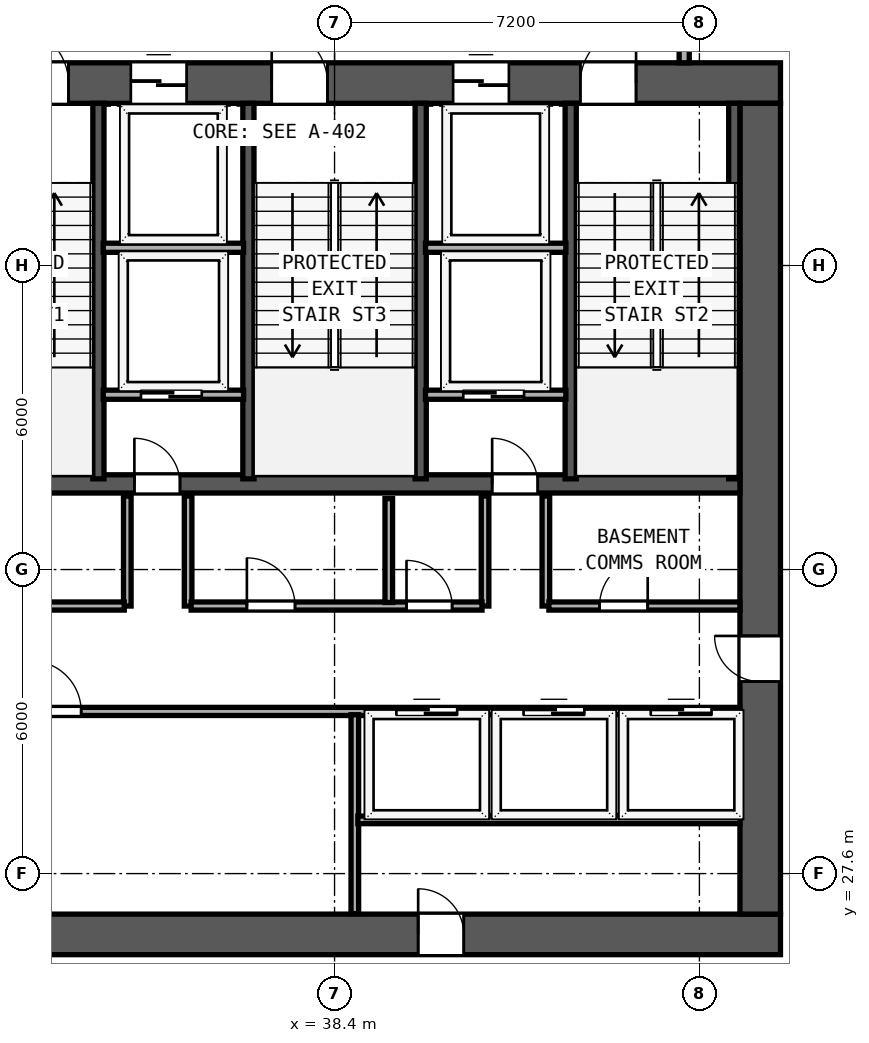
"""IFC4 building model, lengths in metres.
Left out: names, types, materials, properties, quantities, classifications, styles, units other than length and angle.
Written with IfcOpenShell. Run it as: python <this file> out.ifc"""

import sys

from ifc_helpers import new_model, si_unit, direction, frame, frame_2d, origin, place, context, subcontext, project, spatial, rectangle, extrude, element, fill, save


model = new_model("IFC4")
c1 = context("Model", 3, precision=1e-05, world=origin(), true_north=direction((0.0, 1.0)))
c2 = subcontext(c1, "Body", "Model", "MODEL_VIEW")
j1 = project(units=[si_unit("LENGTHUNIT", "METRE"), si_unit("PLANEANGLEUNIT", "RADIAN")], contexts=[c1])
p1 = place(None, origin())
s1 = spatial("IfcSite", under=j1, at=p1, CompositionType="ELEMENT")
p2 = place(p1, origin())
s2 = spatial("IfcBuilding", under=s1, at=p2, CompositionType="ELEMENT")
p3 = place(p2, frame((0.0, 0.0, -4.8)))
s3 = spatial("IfcBuildingStorey", under=s2, at=p3, CompositionType="ELEMENT", Elevation=-4.8)
p4 = place(p3, frame((29.6, 26.4, 0.0), z_axis=(0.0, 0.0, 1.0), x_axis=(1.0, 0.0, 0.0)))
e1 = element("IfcWall", 1, at=p4, inside=s3, PredefinedType="SHEAR", context=c2, shape_type="SweptSolid", body=[
    extrude(rectangle(XDim=17.6, YDim=0.8, at=frame_2d((8.8, 0.0))), origin(), (0.0, 0.0, 1.0), 4.5),
])
p5 = place(p4, frame((11.35, 0.0, 0.0), z_axis=(0.0, 0.0, 1.0), x_axis=(-1.0, 0.0, 0.0)))
e2 = element("IfcOpeningElement", 2, at=p5, cuts=e1, PredefinedType="OPENING", context=c2, shape_type="SweptSolid", body=[
    extrude(rectangle(XDim=0.9, YDim=2.1, at=frame_2d((0.45, 1.05))), frame((0.0, 0.41, 0.0), z_axis=(0.0, -1.0, 0.0), x_axis=(1.0, 0.0, 0.0)), (0.0, 0.0, 1.0), 0.82),
])
p6 = place(p3, frame((29.6, 43.2, 0.0), z_axis=(0.0, 0.0, 1.0), x_axis=(1.0, 0.0, 0.0)))
e3 = element("IfcWall", 3, at=p6, inside=s3, PredefinedType="SHEAR", context=c2, shape_type="SweptSolid", body=[
    extrude(rectangle(XDim=17.6, YDim=0.8, at=frame_2d((8.8, 0.0))), origin(), (0.0, 0.0, 1.0), 4.5),
])
p7 = place(p6, frame((2.45, 0.0, 0.0)))
e4 = element("IfcOpeningElement", 4, at=p7, cuts=e3, PredefinedType="OPENING", context=c2, shape_type="SweptSolid", body=[
    extrude(rectangle(XDim=1.1, YDim=2.15, at=frame_2d((0.55, 1.075))), frame((0.0, 0.41, 0.0), z_axis=(0.0, -1.0, 0.0), x_axis=(1.0, 0.0, 0.0)), (0.0, 0.0, 1.0), 0.82),
])
p8 = place(p6, frame((7.56, 0.0, 0.0)))
e5 = element("IfcOpeningElement", 5, at=p8, cuts=e3, PredefinedType="OPENING", context=c2, shape_type="SweptSolid", body=[
    extrude(rectangle(XDim=1.1, YDim=2.15, at=frame_2d((0.55, 1.075))), frame((0.0, 0.41, 0.0), z_axis=(0.0, -1.0, 0.0), x_axis=(1.0, 0.0, 0.0)), (0.0, 0.0, 1.0), 0.82),
])
p9 = place(p6, frame((13.65, 0.0, 0.0)))
e6 = element("IfcOpeningElement", 6, at=p9, cuts=e3, PredefinedType="OPENING", context=c2, shape_type="SweptSolid", body=[
    extrude(rectangle(XDim=1.1, YDim=2.15, at=frame_2d((0.55, 1.075))), frame((0.0, 0.41, 0.0), z_axis=(0.0, -1.0, 0.0), x_axis=(1.0, 0.0, 0.0)), (0.0, 0.0, 1.0), 0.82),
])
p10 = place(p6, frame((4.78, 0.0, 0.0)))
e7 = element("IfcOpeningElement", 7, at=p10, cuts=e3, PredefinedType="OPENING", context=c2, shape_type="SweptSolid", body=[
    extrude(rectangle(XDim=1.1, YDim=2.2, at=frame_2d((0.55, 1.1))), frame((0.0, 0.41, 0.0), z_axis=(0.0, -1.0, 0.0), x_axis=(1.0, 0.0, 0.0)), (0.0, 0.0, 1.0), 0.82),
])
p11 = place(p6, frame((11.14, 0.0, 0.0)))
e8 = element("IfcOpeningElement", 8, at=p11, cuts=e3, PredefinedType="OPENING", context=c2, shape_type="SweptSolid", body=[
    extrude(rectangle(XDim=1.1, YDim=2.2, at=frame_2d((0.55, 1.1))), frame((0.0, 0.41, 0.0), z_axis=(0.0, -1.0, 0.0), x_axis=(1.0, 0.0, 0.0)), (0.0, 0.0, 1.0), 0.82),
])
p12 = place(p3, frame((46.8, 26.8, 0.0), z_axis=(0.0, 0.0, 1.0), x_axis=(0.0, 1.0, 0.0)))
e9 = element("IfcWall", 9, at=p12, inside=s3, PredefinedType="SHEAR", context=c2, shape_type="SweptSolid", body=[
    extrude(rectangle(XDim=16.0, YDim=0.8, at=frame_2d((8.0, 0.0))), origin(), (0.0, 0.0, 1.0), 4.5),
])
p13 = place(p12, frame((5.49, 0.0, 0.0), z_axis=(0.0, 0.0, 1.0), x_axis=(-1.0, 0.0, 0.0)))
e10 = element("IfcOpeningElement", 10, at=p13, cuts=e9, PredefinedType="OPENING", context=c2, shape_type="SweptSolid", body=[
    extrude(rectangle(XDim=0.9, YDim=2.1, at=frame_2d((0.45, 1.05))), frame((0.0, 0.41, 0.0), z_axis=(0.0, -1.0, 0.0), x_axis=(1.0, 0.0, 0.0)), (0.0, 0.0, 1.0), 0.82),
])
p14 = place(p3, frame((30.4, 35.29, 0.0), z_axis=(0.0, 0.0, 1.0), x_axis=(1.0, 0.0, 0.0)))
e11 = element("IfcWall", 11, at=p14, inside=s3, PredefinedType="SHEAR", context=c2, shape_type="SweptSolid", body=[
    extrude(rectangle(XDim=16.0, YDim=0.36, at=frame_2d((8.0, 0.0))), origin(), (0.0, 0.0, 1.0), 4.5),
])
p15 = place(p14, frame((4.95, 0.0, 0.0), z_axis=(0.0, 0.0, 1.0), x_axis=(-1.0, 0.0, 0.0)))
e12 = element("IfcOpeningElement", 12, at=p15, cuts=e11, PredefinedType="OPENING", context=c2, shape_type="SweptSolid", body=[
    extrude(rectangle(XDim=0.9, YDim=2.1, at=frame_2d((0.45, 1.05))), frame((0.0, 0.19, 0.0), z_axis=(0.0, -1.0, 0.0), x_axis=(1.0, 0.0, 0.0)), (0.0, 0.0, 1.0), 0.38),
])
p16 = place(p14, frame((12.01, 0.0, 0.0), z_axis=(0.0, 0.0, 1.0), x_axis=(-1.0, 0.0, 0.0)))
e13 = element("IfcOpeningElement", 13, at=p16, cuts=e11, PredefinedType="OPENING", context=c2, shape_type="SweptSolid", body=[
    extrude(rectangle(XDim=0.9, YDim=2.1, at=frame_2d((0.45, 1.05))), frame((0.0, 0.19, 0.0), z_axis=(0.0, -1.0, 0.0), x_axis=(1.0, 0.0, 0.0)), (0.0, 0.0, 1.0), 0.38),
])
for number, where, z_axis, x_axis in (
    (14, (33.74, 35.39, 0.0), (0.0, 0.0, 1.0), (0.0, 1.0, 0.0)),
    (15, (36.7, 35.39, 0.0), (0.0, 0.0, 1.0), (0.0, 1.0, 0.0)),
    (16, (40.1, 35.39, 0.0), (0.0, 0.0, 1.0), (0.0, 1.0, 0.0)),
    (17, (43.06, 35.39, 0.0), (0.0, 0.0, 1.0), (0.0, 1.0, 0.0)),
    (18, (46.288, 35.39, 0.0), (0.0, 0.0, 1.0), (0.0, 1.0, 0.0)),
):
    element("IfcWall", number, at=place(p3, frame(where, z_axis=z_axis, x_axis=x_axis)), inside=s3, PredefinedType="SHEAR", context=c2, shape_type="SweptSolid", body=[
        extrude(rectangle(XDim=7.41, YDim=0.22, at=frame_2d((3.705, 0.0))), origin(), (0.0, 0.0, 1.0), 4.5),
    ])
p17 = place(p3, frame((45.3, 43.6, 0.0), z_axis=(0.0, 0.0, 1.0), x_axis=(0.0, 1.0, 0.0)))
e19 = element("IfcWall", 19, at=p17, inside=s3, PredefinedType="SOLIDWALL", context=c2, shape_type="SweptSolid", body=[
    extrude(rectangle(XDim=2.835, YDim=0.2, at=frame_2d((1.417, 0.0))), origin(), (0.0, 0.0, 1.0), 4.5),
])
p18 = place(p17, frame((0.7, 0.0, 0.0)))
e20 = element("IfcOpeningElement", 20, at=p18, cuts=e19, PredefinedType="OPENING", context=c2, shape_type="SweptSolid", body=[
    extrude(rectangle(XDim=1.1, YDim=2.15, at=frame_2d((0.55, 1.075))), frame((0.0, 0.11, 0.0), z_axis=(0.0, -1.0, 0.0), x_axis=(1.0, 0.0, 0.0)), (0.0, 0.0, 1.0), 0.22),
])
for number, where, z_axis, x_axis in (
    (21, (33.835, 39.95, 0.0), (0.0, 0.0, 1.0), (1.0, 0.0, 0.0)),
    (22, (40.195, 39.95, 0.0), (0.0, 0.0, 1.0), (1.0, 0.0, 0.0)),
):
    element("IfcWall", number, at=place(p3, frame(where, z_axis=z_axis, x_axis=x_axis)), inside=s3, PredefinedType="SOLIDWALL", context=c2, shape_type="SweptSolid", body=[
        extrude(rectangle(XDim=2.77, YDim=0.18, at=frame_2d((1.385, 0.0))), origin(), (0.0, 0.0, 1.0), 4.5),
    ])
p19 = place(p3, frame((33.835, 37.05, 0.0), z_axis=(0.0, 0.0, 1.0), x_axis=(1.0, 0.0, 0.0)))
e23 = element("IfcWall", 23, at=p19, inside=s3, PredefinedType="SOLIDWALL", context=c2, shape_type="SweptSolid", body=[
    extrude(rectangle(XDim=2.77, YDim=0.18, at=frame_2d((1.385, 0.0))), origin(), (0.0, 0.0, 1.0), 4.5),
])
p20 = place(p19, frame((1.945, 0.0, 0.0), z_axis=(0.0, 0.0, 1.0), x_axis=(-1.0, 0.0, 0.0)))
e24 = element("IfcOpeningElement", 24, at=p20, cuts=e23, PredefinedType="OPENING", context=c2, shape_type="SweptSolid", body=[
    extrude(rectangle(XDim=1.2, YDim=2.2, at=frame_2d((0.6, 1.1))), frame((0.0, 0.1, 0.0), z_axis=(0.0, -1.0, 0.0), x_axis=(1.0, 0.0, 0.0)), (0.0, 0.0, 1.0), 0.2),
])
for number, where, z_axis, x_axis in (
    (25, (34.31, 32.88, 0.0), (0.0, 0.0, 1.0), (0.0, 1.0, 0.0)),
    (26, (35.51, 32.88, 0.0), (0.0, 0.0, 1.0), (0.0, 1.0, 0.0)),
):
    element("IfcWall", number, at=place(p3, frame(where, z_axis=z_axis, x_axis=x_axis)), inside=s3, PredefinedType="SOLIDWALL", context=c2, shape_type="SweptSolid", body=[
        extrude(rectangle(XDim=2.17, YDim=0.15, at=frame_2d((1.085, 0.0))), origin(), (0.0, 0.0, 1.0), 4.5),
    ])
p21 = place(p3, frame((40.195, 37.05, 0.0), z_axis=(0.0, 0.0, 1.0), x_axis=(1.0, 0.0, 0.0)))
e27 = element("IfcWall", 27, at=p21, inside=s3, PredefinedType="SOLIDWALL", context=c2, shape_type="SweptSolid", body=[
    extrude(rectangle(XDim=2.77, YDim=0.18, at=frame_2d((1.385, 0.0))), origin(), (0.0, 0.0, 1.0), 4.5),
])
p22 = place(p21, frame((1.945, 0.0, 0.0), z_axis=(0.0, 0.0, 1.0), x_axis=(-1.0, 0.0, 0.0)))
e28 = element("IfcOpeningElement", 28, at=p22, cuts=e27, PredefinedType="OPENING", context=c2, shape_type="SweptSolid", body=[
    extrude(rectangle(XDim=1.2, YDim=2.2, at=frame_2d((0.6, 1.1))), frame((0.0, 0.1, 0.0), z_axis=(0.0, -1.0, 0.0), x_axis=(1.0, 0.0, 0.0)), (0.0, 0.0, 1.0), 0.2),
])
for number, where, z_axis, x_axis in (
    (29, (41.37, 32.88, 0.0), (0.0, 0.0, 1.0), (0.0, 1.0, 0.0)),
    (30, (42.57, 32.88, 0.0), (0.0, 0.0, 1.0), (0.0, 1.0, 0.0)),
):
    element("IfcWall", number, at=place(p3, frame(where, z_axis=z_axis, x_axis=x_axis)), inside=s3, PredefinedType="SOLIDWALL", context=c2, shape_type="SweptSolid", body=[
        extrude(rectangle(XDim=2.17, YDim=0.15, at=frame_2d((1.085, 0.0))), origin(), (0.0, 0.0, 1.0), 4.5),
    ])
p23 = place(p3, frame((30.4, 32.88, 0.0), z_axis=(0.0, 0.0, 1.0), x_axis=(1.0, 0.0, 0.0)))
e31 = element("IfcWall", 31, at=p23, inside=s3, PredefinedType="SOLIDWALL", context=c2, shape_type="SweptSolid", body=[
    extrude(rectangle(XDim=3.85, YDim=0.16, at=frame_2d((1.925, 0.0))), origin(), (0.0, 0.0, 1.0), 4.5),
])
p24 = place(p23, frame((2.15, 0.0, 0.0), z_axis=(0.0, 0.0, 1.0), x_axis=(-1.0, 0.0, 0.0)))
e32 = element("IfcOpeningElement", 32, at=p24, cuts=e31, PredefinedType="OPENING", context=c2, shape_type="SweptSolid", body=[
    extrude(rectangle(XDim=0.95, YDim=2.12, at=frame_2d((0.475, 1.06))), frame((0.0, 0.09, 0.0), z_axis=(0.0, -1.0, 0.0), x_axis=(1.0, 0.0, 0.0)), (0.0, 0.0, 1.0), 0.18),
])
p25 = place(p3, frame((35.57, 32.88, 0.0), z_axis=(0.0, 0.0, 1.0), x_axis=(1.0, 0.0, 0.0)))
e33 = element("IfcWall", 33, at=p25, inside=s3, PredefinedType="SOLIDWALL", context=c2, shape_type="SweptSolid", body=[
    extrude(rectangle(XDim=5.74, YDim=0.16, at=frame_2d((2.87, 0.0))), origin(), (0.0, 0.0, 1.0), 4.5),
])
p26 = place(p25, frame((2.05, 0.0, 0.0), z_axis=(0.0, 0.0, 1.0), x_axis=(-1.0, 0.0, 0.0)))
e34 = element("IfcOpeningElement", 34, at=p26, cuts=e33, PredefinedType="OPENING", context=c2, shape_type="SweptSolid", body=[
    extrude(rectangle(XDim=0.95, YDim=2.12, at=frame_2d((0.475, 1.06))), frame((0.0, 0.09, 0.0), z_axis=(0.0, -1.0, 0.0), x_axis=(1.0, 0.0, 0.0)), (0.0, 0.0, 1.0), 0.18),
])
p27 = place(p25, frame((5.15, 0.0, 0.0), z_axis=(0.0, 0.0, 1.0), x_axis=(-1.0, 0.0, 0.0)))
e35 = element("IfcOpeningElement", 35, at=p27, cuts=e33, PredefinedType="OPENING", context=c2, shape_type="SweptSolid", body=[
    extrude(rectangle(XDim=0.9, YDim=2.1, at=frame_2d((0.45, 1.05))), frame((0.0, 0.09, 0.0), z_axis=(0.0, -1.0, 0.0), x_axis=(1.0, 0.0, 0.0)), (0.0, 0.0, 1.0), 0.18),
])
p28 = place(p3, frame((42.63, 32.88, 0.0), z_axis=(0.0, 0.0, 1.0), x_axis=(1.0, 0.0, 0.0)))
e36 = element("IfcWall", 36, at=p28, inside=s3, PredefinedType="SOLIDWALL", context=c2, shape_type="SweptSolid", body=[
    extrude(rectangle(XDim=3.77, YDim=0.16, at=frame_2d((1.885, 0.0))), origin(), (0.0, 0.0, 1.0), 4.5),
])
p29 = place(p28, frame((1.95, 0.0, 0.0), z_axis=(0.0, 0.0, 1.0), x_axis=(-1.0, 0.0, 0.0)))
e37 = element("IfcOpeningElement", 37, at=p29, cuts=e36, PredefinedType="OPENING", context=c2, shape_type="SweptSolid", body=[
    extrude(rectangle(XDim=0.95, YDim=2.12, at=frame_2d((0.475, 1.06))), frame((0.0, 0.09, 0.0), z_axis=(0.0, -1.0, 0.0), x_axis=(1.0, 0.0, 0.0)), (0.0, 0.0, 1.0), 0.18),
])
p30 = place(p3, frame((39.47, 32.95, 0.0), z_axis=(0.0, 0.0, 1.0), x_axis=(0.0, 1.0, 0.0)))
e38 = element("IfcWall", 38, at=p30, inside=s3, PredefinedType="SOLIDWALL", context=c2, shape_type="SweptSolid", body=[
    extrude(rectangle(XDim=2.05, YDim=0.15, at=frame_2d((1.025, 0.0))), origin(), (0.0, 0.0, 1.0), 4.5),
])
p31 = place(p3, frame((30.4, 30.8, 0.0), z_axis=(0.0, 0.0, 1.0), x_axis=(1.0, 0.0, 0.0)))
e39 = element("IfcWall", 39, at=p31, inside=s3, PredefinedType="SOLIDWALL", context=c2, shape_type="SweptSolid", body=[
    extrude(rectangle(XDim=16.0, YDim=0.16, at=frame_2d((8.0, 0.0))), origin(), (0.0, 0.0, 1.0), 4.5),
])
p32 = place(p31, frame((2.0, 0.0, 0.0)))
e40 = element("IfcOpeningElement", 40, at=p32, cuts=e39, PredefinedType="OPENING", context=c2, shape_type="SweptSolid", body=[
    extrude(rectangle(XDim=1.0, YDim=2.1, at=frame_2d((0.5, 1.05))), frame((0.0, 0.09, 0.0), z_axis=(0.0, -1.0, 0.0), x_axis=(1.0, 0.0, 0.0)), (0.0, 0.0, 1.0), 0.18),
])
p33 = place(p31, frame((9.22, 0.0, 0.0)))
e41 = element("IfcOpeningElement", 41, at=p33, cuts=e39, PredefinedType="OPENING", context=c2, shape_type="SweptSolid", body=[
    extrude(rectangle(XDim=1.2, YDim=2.2, at=frame_2d((0.6, 1.1))), frame((0.0, 0.09, 0.0), z_axis=(0.0, -1.0, 0.0), x_axis=(1.0, 0.0, 0.0)), (0.0, 0.0, 1.0), 0.18),
])
p34 = place(p31, frame((11.73, 0.0, 0.0)))
e42 = element("IfcOpeningElement", 42, at=p34, cuts=e39, PredefinedType="OPENING", context=c2, shape_type="SweptSolid", body=[
    extrude(rectangle(XDim=1.2, YDim=2.2, at=frame_2d((0.6, 1.1))), frame((0.0, 0.09, 0.0), z_axis=(0.0, -1.0, 0.0), x_axis=(1.0, 0.0, 0.0)), (0.0, 0.0, 1.0), 0.18),
])
p35 = place(p31, frame((14.24, 0.0, 0.0)))
e43 = element("IfcOpeningElement", 43, at=p35, cuts=e39, PredefinedType="OPENING", context=c2, shape_type="SweptSolid", body=[
    extrude(rectangle(XDim=1.2, YDim=2.2, at=frame_2d((0.6, 1.1))), frame((0.0, 0.09, 0.0), z_axis=(0.0, -1.0, 0.0), x_axis=(1.0, 0.0, 0.0)), (0.0, 0.0, 1.0), 0.18),
])
p36 = place(p3, frame((38.8, 26.81, 0.0), z_axis=(0.0, 0.0, 1.0), x_axis=(0.0, 1.0, 0.0)))
e44 = element("IfcWall", 44, at=p36, inside=s3, PredefinedType="SOLIDWALL", context=c2, shape_type="SweptSolid", body=[
    extrude(rectangle(XDim=3.925, YDim=0.15, at=frame_2d((1.962, 0.0))), origin(), (0.0, 0.0, 1.0), 4.5),
])
p37 = place(p3, frame((38.86, 28.66, 0.0), z_axis=(0.0, 0.0, 1.0), x_axis=(1.0, 0.0, 0.0)))
e45 = element("IfcWall", 45, at=p37, inside=s3, PredefinedType="PARTITIONING", context=c2, shape_type="SweptSolid", body=[
    extrude(rectangle(XDim=7.54, YDim=0.15, at=frame_2d((3.77, 0.0))), origin(), (0.0, 0.0, 1.0), 4.5),
])
for number, where, z_axis, x_axis in (
    (46, (41.47, 28.75, 0.0), (0.0, 0.0, 1.0), (0.0, 1.0, 0.0)),
    (47, (43.98, 28.75, 0.0), (0.0, 0.0, 1.0), (0.0, 1.0, 0.0)),
):
    element("IfcWall", number, at=place(p3, frame(where, z_axis=z_axis, x_axis=x_axis)), inside=s3, PredefinedType="SOLIDWALL", context=c2, shape_type="SweptSolid", body=[
        extrude(rectangle(XDim=1.985, YDim=0.15, at=frame_2d((0.993, 0.0))), origin(), (0.0, 0.0, 1.0), 4.5),
    ])
p38 = place(p7, origin())
e48 = element("IfcDoor", 48, at=p38, inside=s3, OperationType="SINGLE_SWING_LEFT", PredefinedType="DOOR", context=c2, shape_type="SweptSolid", body=[
    extrude(rectangle(XDim=1.1, YDim=2.15, at=frame_2d((0.55, 1.075))), frame((0.0, 0.185, 0.0), z_axis=(0.0, -1.0, 0.0), x_axis=(1.0, 0.0, 0.0)), (0.0, 0.0, 1.0), 0.05),
])
fill(e4, e48)
p39 = place(p8, origin())
e49 = element("IfcDoor", 49, at=p39, inside=s3, OperationType="SINGLE_SWING_LEFT", PredefinedType="DOOR", context=c2, shape_type="SweptSolid", body=[
    extrude(rectangle(XDim=1.1, YDim=2.15, at=frame_2d((0.55, 1.075))), frame((0.0, 0.185, 0.0), z_axis=(0.0, -1.0, 0.0), x_axis=(1.0, 0.0, 0.0)), (0.0, 0.0, 1.0), 0.05),
])
fill(e5, e49)
p40 = place(p9, origin())
e50 = element("IfcDoor", 50, at=p40, inside=s3, OperationType="SINGLE_SWING_RIGHT", PredefinedType="DOOR", context=c2, shape_type="SweptSolid", body=[
    extrude(rectangle(XDim=1.1, YDim=2.15, at=frame_2d((0.55, 1.075))), frame((0.0, 0.185, 0.0), z_axis=(0.0, -1.0, 0.0), x_axis=(1.0, 0.0, 0.0)), (0.0, 0.0, 1.0), 0.05),
])
fill(e6, e50)
p41 = place(p10, origin())
e51 = element("IfcDoor", 51, at=p41, inside=s3, OperationType="SLIDING_TO_LEFT", PredefinedType="DOOR", context=c2, shape_type="SweptSolid", body=[
    extrude(rectangle(XDim=1.1, YDim=2.2, at=frame_2d((0.55, 1.1))), frame((0.0, 0.185, 0.0), z_axis=(0.0, -1.0, 0.0), x_axis=(1.0, 0.0, 0.0)), (0.0, 0.0, 1.0), 0.05),
])
fill(e7, e51)
p42 = place(p11, origin())
e52 = element("IfcDoor", 52, at=p42, inside=s3, OperationType="SLIDING_TO_LEFT", PredefinedType="DOOR", context=c2, shape_type="SweptSolid", body=[
    extrude(rectangle(XDim=1.1, YDim=2.2, at=frame_2d((0.55, 1.1))), frame((0.0, 0.185, 0.0), z_axis=(0.0, -1.0, 0.0), x_axis=(1.0, 0.0, 0.0)), (0.0, 0.0, 1.0), 0.05),
])
fill(e8, e52)
p43 = place(p20, origin())
e53 = element("IfcDoor", 53, at=p43, inside=s3, OperationType="SLIDING_TO_RIGHT", PredefinedType="DOOR", context=c2, shape_type="SweptSolid", body=[
    extrude(rectangle(XDim=1.2, YDim=2.2, at=frame_2d((0.6, 1.1))), frame((0.0, 0.025, 0.0), z_axis=(0.0, -1.0, 0.0), x_axis=(1.0, 0.0, 0.0)), (0.0, 0.0, 1.0), 0.05),
])
fill(e24, e53)
p44 = place(p15, origin())
e54 = element("IfcDoor", 54, at=p44, inside=s3, OperationType="SINGLE_SWING_RIGHT", PredefinedType="DOOR", context=c2, shape_type="SweptSolid", body=[
    extrude(rectangle(XDim=0.9, YDim=2.1, at=frame_2d((0.45, 1.05))), frame((0.0, 0.025, 0.0), z_axis=(0.0, -1.0, 0.0), x_axis=(1.0, 0.0, 0.0)), (0.0, 0.0, 1.0), 0.05),
])
fill(e12, e54)
p45 = place(p22, origin())
e55 = element("IfcDoor", 55, at=p45, inside=s3, OperationType="SLIDING_TO_RIGHT", PredefinedType="DOOR", context=c2, shape_type="SweptSolid", body=[
    extrude(rectangle(XDim=1.2, YDim=2.2, at=frame_2d((0.6, 1.1))), frame((0.0, 0.025, 0.0), z_axis=(0.0, -1.0, 0.0), x_axis=(1.0, 0.0, 0.0)), (0.0, 0.0, 1.0), 0.05),
])
fill(e28, e55)
p46 = place(p16, origin())
e56 = element("IfcDoor", 56, at=p46, inside=s3, OperationType="SINGLE_SWING_RIGHT", PredefinedType="DOOR", context=c2, shape_type="SweptSolid", body=[
    extrude(rectangle(XDim=0.9, YDim=2.1, at=frame_2d((0.45, 1.05))), frame((0.0, 0.025, 0.0), z_axis=(0.0, -1.0, 0.0), x_axis=(1.0, 0.0, 0.0)), (0.0, 0.0, 1.0), 0.05),
])
fill(e13, e56)
p47 = place(p13, origin())
e57 = element("IfcDoor", 57, at=p47, inside=s3, OperationType="SINGLE_SWING_LEFT", PredefinedType="DOOR", context=c2, shape_type="SweptSolid", body=[
    extrude(rectangle(XDim=0.9, YDim=2.1, at=frame_2d((0.45, 1.05))), frame((0.0, 0.025, 0.0), z_axis=(0.0, -1.0, 0.0), x_axis=(1.0, 0.0, 0.0)), (0.0, 0.0, 1.0), 0.05),
])
fill(e10, e57)
p48 = place(p26, origin())
e58 = element("IfcDoor", 58, at=p48, inside=s3, OperationType="SINGLE_SWING_RIGHT", PredefinedType="DOOR", context=c2, shape_type="SweptSolid", body=[
    extrude(rectangle(XDim=0.95, YDim=2.12, at=frame_2d((0.475, 1.06))), frame((0.0, 0.025, 0.0), z_axis=(0.0, -1.0, 0.0), x_axis=(1.0, 0.0, 0.0)), (0.0, 0.0, 1.0), 0.05),
])
fill(e34, e58)
p49 = place(p27, origin())
e59 = element("IfcDoor", 59, at=p49, inside=s3, OperationType="SINGLE_SWING_RIGHT", PredefinedType="DOOR", context=c2, shape_type="SweptSolid", body=[
    extrude(rectangle(XDim=0.9, YDim=2.1, at=frame_2d((0.45, 1.05))), frame((0.0, 0.025, 0.0), z_axis=(0.0, -1.0, 0.0), x_axis=(1.0, 0.0, 0.0)), (0.0, 0.0, 1.0), 0.05),
])
fill(e35, e59)
p50 = place(p29, origin())
e60 = element("IfcDoor", 60, at=p50, inside=s3, OperationType="SINGLE_SWING_LEFT", PredefinedType="DOOR", context=c2, shape_type="SweptSolid", body=[
    extrude(rectangle(XDim=0.95, YDim=2.12, at=frame_2d((0.475, 1.06))), frame((0.0, 0.025, 0.0), z_axis=(0.0, -1.0, 0.0), x_axis=(1.0, 0.0, 0.0)), (0.0, 0.0, 1.0), 0.05),
])
fill(e37, e60)
p51 = place(p32, origin())
e61 = element("IfcDoor", 61, at=p51, inside=s3, OperationType="SINGLE_SWING_LEFT", PredefinedType="DOOR", context=c2, shape_type="SweptSolid", body=[
    extrude(rectangle(XDim=1.0, YDim=2.1, at=frame_2d((0.5, 1.05))), frame((0.0, 0.025, 0.0), z_axis=(0.0, -1.0, 0.0), x_axis=(1.0, 0.0, 0.0)), (0.0, 0.0, 1.0), 0.05),
])
fill(e40, e61)
p52 = place(p5, origin())
e62 = element("IfcDoor", 62, at=p52, inside=s3, OperationType="SINGLE_SWING_RIGHT", PredefinedType="DOOR", context=c2, shape_type="SweptSolid", body=[
    extrude(rectangle(XDim=0.9, YDim=2.1, at=frame_2d((0.45, 1.05))), frame((0.0, -0.195, 0.0), z_axis=(0.0, -1.0, 0.0), x_axis=(1.0, 0.0, 0.0)), (0.0, 0.0, 1.0), 0.05),
])
fill(e2, e62)
p53 = place(p33, origin())
e63 = element("IfcDoor", 63, at=p53, inside=s3, OperationType="SLIDING_TO_RIGHT", PredefinedType="DOOR", context=c2, shape_type="SweptSolid", body=[
    extrude(rectangle(XDim=1.2, YDim=2.2, at=frame_2d((0.6, 1.1))), frame((0.0, 0.025, 0.0), z_axis=(0.0, -1.0, 0.0), x_axis=(1.0, 0.0, 0.0)), (0.0, 0.0, 1.0), 0.05),
])
fill(e41, e63)
p54 = place(p34, origin())
e64 = element("IfcDoor", 64, at=p54, inside=s3, OperationType="SLIDING_TO_RIGHT", PredefinedType="DOOR", context=c2, shape_type="SweptSolid", body=[
    extrude(rectangle(XDim=1.2, YDim=2.2, at=frame_2d((0.6, 1.1))), frame((0.0, 0.025, 0.0), z_axis=(0.0, -1.0, 0.0), x_axis=(1.0, 0.0, 0.0)), (0.0, 0.0, 1.0), 0.05),
])
fill(e42, e64)
p55 = place(p35, origin())
e65 = element("IfcDoor", 65, at=p55, inside=s3, OperationType="SLIDING_TO_RIGHT", PredefinedType="DOOR", context=c2, shape_type="SweptSolid", body=[
    extrude(rectangle(XDim=1.2, YDim=2.2, at=frame_2d((0.6, 1.1))), frame((0.0, 0.025, 0.0), z_axis=(0.0, -1.0, 0.0), x_axis=(1.0, 0.0, 0.0)), (0.0, 0.0, 1.0), 0.05),
])
fill(e43, e65)
save(model, sys.argv[1])
